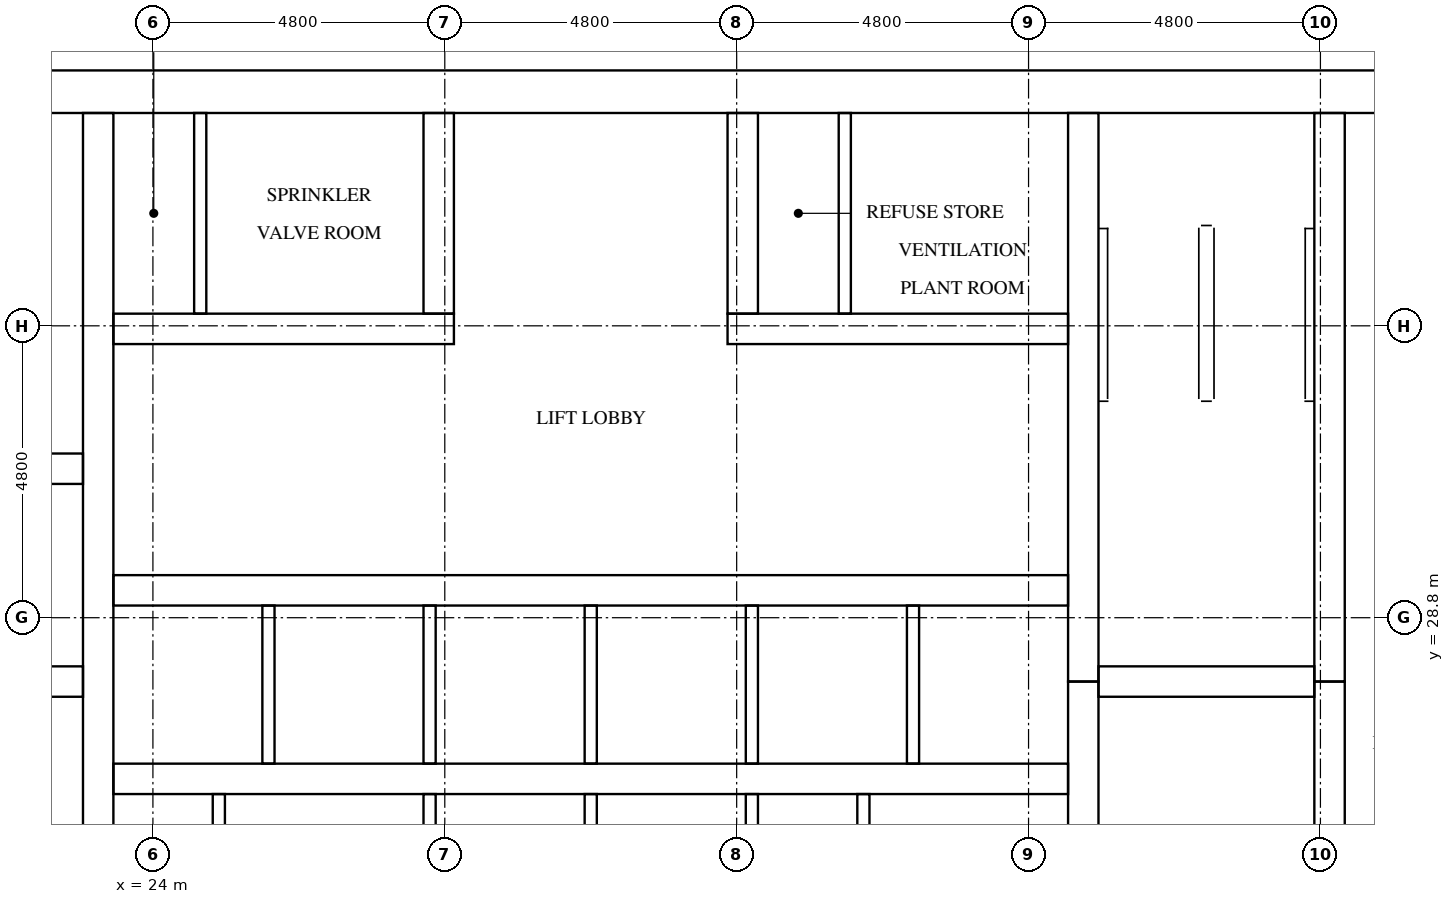
"""IFC4 building model, lengths in metres.
Left out: names, types, materials, properties, quantities, classifications, styles, units other than length and angle.
Written with IfcOpenShell. Run it as: python <this file> out.ifc"""

import sys

from ifc_helpers import new_model, si_unit, direction, frame, frame_2d, origin, place, context, subcontext, project, spatial, rectangle, extrude, element, fill, save


model = new_model("IFC4")
c1 = context("Model", 3, precision=1e-05, world=origin(), true_north=direction((0.0, 1.0)))
c2 = subcontext(c1, "Body", "Model", "MODEL_VIEW")
j1 = project(units=[si_unit("LENGTHUNIT", "METRE"), si_unit("PLANEANGLEUNIT", "RADIAN")], contexts=[c1])
p1 = place(None, origin())
s1 = spatial("IfcSite", under=j1, at=p1, CompositionType="ELEMENT")
p2 = place(p1, origin())
s2 = spatial("IfcBuilding", under=s1, at=p2, CompositionType="ELEMENT")
p3 = place(p2, frame((0.0, 0.0, 189.4)))
s3 = spatial("IfcBuildingStorey", under=s2, at=p3, CompositionType="ELEMENT", Elevation=189.4)
p4 = place(p3, frame((15.0, 37.45, 0.0), z_axis=(0.0, 0.0, 1.0), x_axis=(1.0, 0.0, 0.0)))
e1 = element("IfcWall", 1, at=p4, inside=s3, PredefinedType="SHEAR", context=c2, shape_type="SweptSolid", body=[
    extrude(rectangle(XDim=32.4, YDim=0.7, at=frame_2d((16.2, 0.0))), origin(), (0.0, 0.0, 1.0), 3.2),
])
p5 = place(p4, frame((15.3, 0.0, 0.0)))
e2 = element("IfcOpeningElement", 2, at=p5, cuts=e1, PredefinedType="OPENING", context=c2, shape_type="SweptSolid", body=[
    extrude(rectangle(XDim=1.8, YDim=2.1, at=frame_2d((0.9, 1.05))), frame((0.0, 0.36, 0.0), z_axis=(0.0, -1.0, 0.0), x_axis=(1.0, 0.0, 0.0)), (0.0, 0.0, 1.0), 0.72),
])
p6 = place(p4, frame((1.544, 0.0, 0.0)))
e3 = element("IfcOpeningElement", 3, at=p6, cuts=e1, PredefinedType="OPENING", context=c2, shape_type="SweptSolid", body=[
    extrude(rectangle(XDim=1.0, YDim=2.1, at=frame_2d((0.5, 1.05))), frame((0.0, 0.36, 0.0), z_axis=(0.0, -1.0, 0.0), x_axis=(1.0, 0.0, 0.0)), (0.0, 0.0, 1.0), 0.72),
])
p7 = place(p4, frame((5.219, 0.0, 0.0)))
e4 = element("IfcOpeningElement", 4, at=p7, cuts=e1, PredefinedType="OPENING", context=c2, shape_type="SweptSolid", body=[
    extrude(rectangle(XDim=1.0, YDim=2.1, at=frame_2d((0.5, 1.05))), frame((0.0, 0.36, 0.0), z_axis=(0.0, -1.0, 0.0), x_axis=(1.0, 0.0, 0.0)), (0.0, 0.0, 1.0), 0.72),
])
p8 = place(p3, frame((23.1, 15.7, 0.0), z_axis=(0.0, 0.0, 1.0), x_axis=(0.0, 1.0, 0.0)))
e5 = element("IfcWall", 5, at=p8, inside=s3, PredefinedType="SHEAR", context=c2, shape_type="SweptSolid", body=[
    extrude(rectangle(XDim=21.4, YDim=0.5, at=frame_2d((10.7, 0.0))), origin(), (0.0, 0.0, 1.0), 3.2),
])
p9 = place(p3, frame((39.3, 24.25, 0.0), z_axis=(0.0, 0.0, 1.0), x_axis=(0.0, 1.0, 0.0)))
e6 = element("IfcWall", 6, at=p9, inside=s3, PredefinedType="SHEAR", context=c2, shape_type="SweptSolid", body=[
    extrude(rectangle(XDim=3.5, YDim=0.5, at=frame_2d((1.75, 0.0))), origin(), (0.0, 0.0, 1.0), 3.2),
])
p10 = place(p3, frame((39.3, 27.75, 0.0), z_axis=(0.0, 0.0, 1.0), x_axis=(0.0, 1.0, 0.0)))
e7 = element("IfcWall", 7, at=p10, inside=s3, PredefinedType="SHEAR", context=c2, shape_type="SweptSolid", body=[
    extrude(rectangle(XDim=9.35, YDim=0.5, at=frame_2d((4.675, 0.0))), origin(), (0.0, 0.0, 1.0), 3.2),
])
p11 = place(p3, frame((43.35, 24.25, 0.0), z_axis=(0.0, 0.0, 1.0), x_axis=(0.0, 1.0, 0.0)))
e8 = element("IfcWall", 8, at=p11, inside=s3, PredefinedType="SHEAR", context=c2, shape_type="SweptSolid", body=[
    extrude(rectangle(XDim=3.5, YDim=0.5, at=frame_2d((1.75, 0.0))), origin(), (0.0, 0.0, 1.0), 3.2),
])
p12 = place(p11, frame((1.2, 0.0, 0.0)))
e9 = element("IfcOpeningElement", 9, at=p12, cuts=e8, PredefinedType="OPENING", context=c2, shape_type="SweptSolid", body=[
    extrude(rectangle(XDim=1.1, YDim=2.1, at=frame_2d((0.55, 1.05))), frame((0.0, 0.26, 0.0), z_axis=(0.0, -1.0, 0.0), x_axis=(1.0, 0.0, 0.0)), (0.0, 0.0, 1.0), 0.52),
])
p13 = place(p3, frame((43.35, 27.75, 0.0), z_axis=(0.0, 0.0, 1.0), x_axis=(0.0, 1.0, 0.0)))
e10 = element("IfcWall", 10, at=p13, inside=s3, PredefinedType="SHEAR", context=c2, shape_type="SweptSolid", body=[
    extrude(rectangle(XDim=9.35, YDim=0.5, at=frame_2d((4.675, 0.0))), origin(), (0.0, 0.0, 1.0), 3.2),
])
p14 = place(p13, frame((7.65, 0.0, 0.0)))
e11 = element("IfcOpeningElement", 11, at=p14, cuts=e10, PredefinedType="OPENING", context=c2, shape_type="SweptSolid", body=[
    extrude(rectangle(XDim=1.2, YDim=2.1, at=frame_2d((0.6, 1.05))), frame((0.0, 0.26, 0.0), z_axis=(0.0, -1.0, 0.0), x_axis=(1.0, 0.0, 0.0)), (0.0, 0.0, 1.0), 0.52),
])
p15 = place(p3, frame((19.3, 27.75, 0.0), z_axis=(0.0, 0.0, 1.0), x_axis=(1.0, 0.0, 0.0)))
e12 = element("IfcWall", 12, at=p15, inside=s3, PredefinedType="SHEAR", context=c2, shape_type="SweptSolid", body=[
    extrude(rectangle(XDim=3.55, YDim=0.5, at=frame_2d((1.775, 0.0))), origin(), (0.0, 0.0, 1.0), 3.2),
])
p16 = place(p3, frame((15.7, 31.25, 0.0), z_axis=(0.0, 0.0, 1.0), x_axis=(1.0, 0.0, 0.0)))
e13 = element("IfcWall", 13, at=p16, inside=s3, PredefinedType="SHEAR", context=c2, shape_type="SweptSolid", body=[
    extrude(rectangle(XDim=7.15, YDim=0.5, at=frame_2d((3.575, 0.0))), origin(), (0.0, 0.0, 1.0), 3.2),
])
p17 = place(p3, frame((39.55, 27.75, 0.0), z_axis=(0.0, 0.0, 1.0), x_axis=(1.0, 0.0, 0.0)))
e14 = element("IfcWall", 14, at=p17, inside=s3, PredefinedType="SHEAR", context=c2, shape_type="SweptSolid", body=[
    extrude(rectangle(XDim=3.55, YDim=0.5, at=frame_2d((1.775, 0.0))), origin(), (0.0, 0.0, 1.0), 3.2),
])
p18 = place(p3, frame((23.35, 26.15, 0.0), z_axis=(0.0, 0.0, 1.0), x_axis=(1.0, 0.0, 0.0)))
e15 = element("IfcWall", 15, at=p18, inside=s3, PredefinedType="SHEAR", context=c2, shape_type="SweptSolid", body=[
    extrude(rectangle(XDim=15.7, YDim=0.5, at=frame_2d((7.85, 0.0))), origin(), (0.0, 0.0, 1.0), 3.2),
])
p19 = place(p3, frame((23.35, 29.25, 0.0), z_axis=(0.0, 0.0, 1.0), x_axis=(1.0, 0.0, 0.0)))
e16 = element("IfcWall", 16, at=p19, inside=s3, PredefinedType="SHEAR", context=c2, shape_type="SweptSolid", body=[
    extrude(rectangle(XDim=15.7, YDim=0.5, at=frame_2d((7.85, 0.0))), origin(), (0.0, 0.0, 1.0), 3.2),
])
p20 = place(p19, frame((0.675, 0.0, 0.0)))
e17 = element("IfcOpeningElement", 17, at=p20, cuts=e16, PredefinedType="OPENING", context=c2, shape_type="SweptSolid", body=[
    extrude(rectangle(XDim=1.1, YDim=2.1, at=frame_2d((0.55, 1.05))), frame((0.0, 0.26, 0.0), z_axis=(0.0, -1.0, 0.0), x_axis=(1.0, 0.0, 0.0)), (0.0, 0.0, 1.0), 0.52),
])
p21 = place(p19, frame((3.325, 0.0, 0.0)))
e18 = element("IfcOpeningElement", 18, at=p21, cuts=e16, PredefinedType="OPENING", context=c2, shape_type="SweptSolid", body=[
    extrude(rectangle(XDim=1.1, YDim=2.1, at=frame_2d((0.55, 1.05))), frame((0.0, 0.26, 0.0), z_axis=(0.0, -1.0, 0.0), x_axis=(1.0, 0.0, 0.0)), (0.0, 0.0, 1.0), 0.52),
])
p22 = place(p19, frame((5.975, 0.0, 0.0)))
e19 = element("IfcOpeningElement", 19, at=p22, cuts=e16, PredefinedType="OPENING", context=c2, shape_type="SweptSolid", body=[
    extrude(rectangle(XDim=1.1, YDim=2.1, at=frame_2d((0.55, 1.05))), frame((0.0, 0.26, 0.0), z_axis=(0.0, -1.0, 0.0), x_axis=(1.0, 0.0, 0.0)), (0.0, 0.0, 1.0), 0.52),
])
p23 = place(p19, frame((8.625, 0.0, 0.0)))
e20 = element("IfcOpeningElement", 20, at=p23, cuts=e16, PredefinedType="OPENING", context=c2, shape_type="SweptSolid", body=[
    extrude(rectangle(XDim=1.1, YDim=2.1, at=frame_2d((0.55, 1.05))), frame((0.0, 0.26, 0.0), z_axis=(0.0, -1.0, 0.0), x_axis=(1.0, 0.0, 0.0)), (0.0, 0.0, 1.0), 0.52),
])
p24 = place(p19, frame((11.275, 0.0, 0.0)))
e21 = element("IfcOpeningElement", 21, at=p24, cuts=e16, PredefinedType="OPENING", context=c2, shape_type="SweptSolid", body=[
    extrude(rectangle(XDim=1.1, YDim=2.1, at=frame_2d((0.55, 1.05))), frame((0.0, 0.26, 0.0), z_axis=(0.0, -1.0, 0.0), x_axis=(1.0, 0.0, 0.0)), (0.0, 0.0, 1.0), 0.52),
])
p25 = place(p19, frame((13.925, 0.0, 0.0)))
e22 = element("IfcOpeningElement", 22, at=p25, cuts=e16, PredefinedType="OPENING", context=c2, shape_type="SweptSolid", body=[
    extrude(rectangle(XDim=1.1, YDim=2.1, at=frame_2d((0.55, 1.05))), frame((0.0, 0.26, 0.0), z_axis=(0.0, -1.0, 0.0), x_axis=(1.0, 0.0, 0.0)), (0.0, 0.0, 1.0), 0.52),
])
p26 = place(p3, frame((23.35, 33.55, 0.0), z_axis=(0.0, 0.0, 1.0), x_axis=(1.0, 0.0, 0.0)))
e23 = element("IfcWall", 23, at=p26, inside=s3, PredefinedType="SHEAR", context=c2, shape_type="SweptSolid", body=[
    extrude(rectangle(XDim=5.6, YDim=0.5, at=frame_2d((2.8, 0.0))), origin(), (0.0, 0.0, 1.0), 3.2),
])
p27 = place(p26, frame((0.164, 0.0, 0.0)))
e24 = element("IfcOpeningElement", 24, at=p27, cuts=e23, PredefinedType="OPENING", context=c2, shape_type="SweptSolid", body=[
    extrude(rectangle(XDim=1.0, YDim=2.1, at=frame_2d((0.5, 1.05))), frame((0.0, 0.26, 0.0), z_axis=(0.0, -1.0, 0.0), x_axis=(1.0, 0.0, 0.0)), (0.0, 0.0, 1.0), 0.52),
])
p28 = place(p26, frame((2.814, 0.0, 0.0)))
e25 = element("IfcOpeningElement", 25, at=p28, cuts=e23, PredefinedType="OPENING", context=c2, shape_type="SweptSolid", body=[
    extrude(rectangle(XDim=1.0, YDim=2.1, at=frame_2d((0.5, 1.05))), frame((0.0, 0.26, 0.0), z_axis=(0.0, -1.0, 0.0), x_axis=(1.0, 0.0, 0.0)), (0.0, 0.0, 1.0), 0.52),
])
p29 = place(p3, frame((33.45, 33.55, 0.0), z_axis=(0.0, 0.0, 1.0), x_axis=(1.0, 0.0, 0.0)))
e26 = element("IfcWall", 26, at=p29, inside=s3, PredefinedType="SHEAR", context=c2, shape_type="SweptSolid", body=[
    extrude(rectangle(XDim=5.6, YDim=0.5, at=frame_2d((2.8, 0.0))), origin(), (0.0, 0.0, 1.0), 3.2),
])
p30 = place(p29, frame((0.664, 0.0, 0.0)))
e27 = element("IfcOpeningElement", 27, at=p30, cuts=e26, PredefinedType="OPENING", context=c2, shape_type="SweptSolid", body=[
    extrude(rectangle(XDim=1.0, YDim=2.1, at=frame_2d((0.5, 1.05))), frame((0.0, 0.26, 0.0), z_axis=(0.0, -1.0, 0.0), x_axis=(1.0, 0.0, 0.0)), (0.0, 0.0, 1.0), 0.52),
])
p31 = place(p29, frame((3.314, 0.0, 0.0)))
e28 = element("IfcOpeningElement", 28, at=p31, cuts=e26, PredefinedType="OPENING", context=c2, shape_type="SweptSolid", body=[
    extrude(rectangle(XDim=1.0, YDim=2.1, at=frame_2d((0.5, 1.05))), frame((0.0, 0.26, 0.0), z_axis=(0.0, -1.0, 0.0), x_axis=(1.0, 0.0, 0.0)), (0.0, 0.0, 1.0), 0.52),
])
for number, where, z_axis, x_axis in (
    (29, (28.7, 33.8, 0.0), (0.0, 0.0, 1.0), (0.0, 1.0, 0.0)),
    (30, (33.7, 33.8, 0.0), (0.0, 0.0, 1.0), (0.0, 1.0, 0.0)),
):
    element("IfcWall", number, at=place(p3, frame(where, z_axis=z_axis, x_axis=x_axis)), inside=s3, PredefinedType="SHEAR", context=c2, shape_type="SweptSolid", body=[
        extrude(rectangle(XDim=3.3, YDim=0.5, at=frame_2d((1.65, 0.0))), origin(), (0.0, 0.0, 1.0), 3.2),
    ])
p32 = place(p3, frame((25.9, 26.4, 0.0), z_axis=(0.0, 0.0, 1.0), x_axis=(0.0, 1.0, 0.0)))
e31 = element("IfcWall", 31, at=p32, inside=s3, PredefinedType="SOLIDWALL", context=c2, shape_type="SweptSolid", body=[
    extrude(rectangle(XDim=2.6, YDim=0.2, at=frame_2d((1.3, 0.0))), origin(), (0.0, 0.0, 1.0), 3.2),
])
p33 = place(p3, frame((28.55, 23.3, 0.0), z_axis=(0.0, 0.0, 1.0), x_axis=(0.0, 1.0, 0.0)))
e32 = element("IfcWall", 32, at=p33, inside=s3, PredefinedType="SOLIDWALL", context=c2, shape_type="SweptSolid", body=[
    extrude(rectangle(XDim=2.6, YDim=0.2, at=frame_2d((1.3, 0.0))), origin(), (0.0, 0.0, 1.0), 3.2),
])
p34 = place(p3, frame((28.55, 26.4, 0.0), z_axis=(0.0, 0.0, 1.0), x_axis=(0.0, 1.0, 0.0)))
e33 = element("IfcWall", 33, at=p34, inside=s3, PredefinedType="SOLIDWALL", context=c2, shape_type="SweptSolid", body=[
    extrude(rectangle(XDim=2.6, YDim=0.2, at=frame_2d((1.3, 0.0))), origin(), (0.0, 0.0, 1.0), 3.2),
])
p35 = place(p3, frame((31.2, 23.3, 0.0), z_axis=(0.0, 0.0, 1.0), x_axis=(0.0, 1.0, 0.0)))
e34 = element("IfcWall", 34, at=p35, inside=s3, PredefinedType="SOLIDWALL", context=c2, shape_type="SweptSolid", body=[
    extrude(rectangle(XDim=2.6, YDim=0.2, at=frame_2d((1.3, 0.0))), origin(), (0.0, 0.0, 1.0), 3.2),
])
p36 = place(p3, frame((31.2, 26.4, 0.0), z_axis=(0.0, 0.0, 1.0), x_axis=(0.0, 1.0, 0.0)))
e35 = element("IfcWall", 35, at=p36, inside=s3, PredefinedType="SOLIDWALL", context=c2, shape_type="SweptSolid", body=[
    extrude(rectangle(XDim=2.6, YDim=0.2, at=frame_2d((1.3, 0.0))), origin(), (0.0, 0.0, 1.0), 3.2),
])
p37 = place(p3, frame((33.85, 23.3, 0.0), z_axis=(0.0, 0.0, 1.0), x_axis=(0.0, 1.0, 0.0)))
e36 = element("IfcWall", 36, at=p37, inside=s3, PredefinedType="SOLIDWALL", context=c2, shape_type="SweptSolid", body=[
    extrude(rectangle(XDim=2.6, YDim=0.2, at=frame_2d((1.3, 0.0))), origin(), (0.0, 0.0, 1.0), 3.2),
])
for number, where, z_axis, x_axis in (
    (37, (33.85, 26.4, 0.0), (0.0, 0.0, 1.0), (0.0, 1.0, 0.0)),
    (38, (36.5, 26.4, 0.0), (0.0, 0.0, 1.0), (0.0, 1.0, 0.0)),
):
    element("IfcWall", number, at=place(p3, frame(where, z_axis=z_axis, x_axis=x_axis)), inside=s3, PredefinedType="SOLIDWALL", context=c2, shape_type="SweptSolid", body=[
        extrude(rectangle(XDim=2.6, YDim=0.2, at=frame_2d((1.3, 0.0))), origin(), (0.0, 0.0, 1.0), 3.2),
    ])
for number, where, z_axis, x_axis in (
    (39, (25.084, 23.3, 0.0), (0.0, 0.0, 1.0), (0.0, 1.0, 0.0)),
    (40, (35.684, 23.3, 0.0), (0.0, 0.0, 1.0), (0.0, 1.0, 0.0)),
):
    element("IfcWall", number, at=place(p3, frame(where, z_axis=z_axis, x_axis=x_axis)), inside=s3, PredefinedType="PARTITIONING", context=c2, shape_type="SweptSolid", body=[
        extrude(rectangle(XDim=2.6, YDim=0.2, at=frame_2d((1.3, 0.0))), origin(), (0.0, 0.0, 1.0), 3.2),
    ])
for number, where, z_axis, x_axis in (
    (41, (24.778, 33.8, 0.0), (0.0, 0.0, 1.0), (0.0, 1.0, 0.0)),
    (42, (35.378, 33.8, 0.0), (0.0, 0.0, 1.0), (0.0, 1.0, 0.0)),
):
    element("IfcWall", number, at=place(p3, frame(where, z_axis=z_axis, x_axis=x_axis)), inside=s3, PredefinedType="PARTITIONING", context=c2, shape_type="SweptSolid", body=[
        extrude(rectangle(XDim=3.3, YDim=0.2, at=frame_2d((1.65, 0.0))), origin(), (0.0, 0.0, 1.0), 3.2),
    ])
p38 = place(p20, origin())
e43 = element("IfcDoor", 43, at=p38, inside=s3, OperationType="DOUBLE_DOOR_SLIDING", PredefinedType="DOOR", context=c2, shape_type="SweptSolid", body=[
    extrude(rectangle(XDim=1.1, YDim=2.1, at=frame_2d((0.55, 1.05))), frame((0.0, 0.025, 0.0), z_axis=(0.0, -1.0, 0.0), x_axis=(1.0, 0.0, 0.0)), (0.0, 0.0, 1.0), 0.05),
])
fill(e17, e43)
p39 = place(p21, origin())
e44 = element("IfcDoor", 44, at=p39, inside=s3, OperationType="DOUBLE_DOOR_SLIDING", PredefinedType="DOOR", context=c2, shape_type="SweptSolid", body=[
    extrude(rectangle(XDim=1.1, YDim=2.1, at=frame_2d((0.55, 1.05))), frame((0.0, 0.025, 0.0), z_axis=(0.0, -1.0, 0.0), x_axis=(1.0, 0.0, 0.0)), (0.0, 0.0, 1.0), 0.05),
])
fill(e18, e44)
p40 = place(p22, origin())
e45 = element("IfcDoor", 45, at=p40, inside=s3, OperationType="DOUBLE_DOOR_SLIDING", PredefinedType="DOOR", context=c2, shape_type="SweptSolid", body=[
    extrude(rectangle(XDim=1.1, YDim=2.1, at=frame_2d((0.55, 1.05))), frame((0.0, 0.025, 0.0), z_axis=(0.0, -1.0, 0.0), x_axis=(1.0, 0.0, 0.0)), (0.0, 0.0, 1.0), 0.05),
])
fill(e19, e45)
p41 = place(p23, origin())
e46 = element("IfcDoor", 46, at=p41, inside=s3, OperationType="DOUBLE_DOOR_SLIDING", PredefinedType="DOOR", context=c2, shape_type="SweptSolid", body=[
    extrude(rectangle(XDim=1.1, YDim=2.1, at=frame_2d((0.55, 1.05))), frame((0.0, 0.025, 0.0), z_axis=(0.0, -1.0, 0.0), x_axis=(1.0, 0.0, 0.0)), (0.0, 0.0, 1.0), 0.05),
])
fill(e20, e46)
p42 = place(p24, origin())
e47 = element("IfcDoor", 47, at=p42, inside=s3, OperationType="DOUBLE_DOOR_SLIDING", PredefinedType="DOOR", context=c2, shape_type="SweptSolid", body=[
    extrude(rectangle(XDim=1.1, YDim=2.1, at=frame_2d((0.55, 1.05))), frame((0.0, 0.025, 0.0), z_axis=(0.0, -1.0, 0.0), x_axis=(1.0, 0.0, 0.0)), (0.0, 0.0, 1.0), 0.05),
])
fill(e21, e47)
p43 = place(p25, origin())
e48 = element("IfcDoor", 48, at=p43, inside=s3, OperationType="DOUBLE_DOOR_SLIDING", PredefinedType="DOOR", context=c2, shape_type="SweptSolid", body=[
    extrude(rectangle(XDim=1.1, YDim=2.1, at=frame_2d((0.55, 1.05))), frame((0.0, 0.025, 0.0), z_axis=(0.0, -1.0, 0.0), x_axis=(1.0, 0.0, 0.0)), (0.0, 0.0, 1.0), 0.05),
])
fill(e22, e48)
p44 = place(p12, origin())
e49 = element("IfcDoor", 49, at=p44, inside=s3, OperationType="DOUBLE_DOOR_SLIDING", PredefinedType="DOOR", context=c2, shape_type="SweptSolid", body=[
    extrude(rectangle(XDim=1.1, YDim=2.1, at=frame_2d((0.55, 1.05))), frame((0.0, 0.025, 0.0), z_axis=(0.0, -1.0, 0.0), x_axis=(1.0, 0.0, 0.0)), (0.0, 0.0, 1.0), 0.05),
])
fill(e9, e49)
p45 = place(p14, origin())
e50 = element("IfcDoor", 50, at=p45, inside=s3, OperationType="SINGLE_SWING_LEFT", PredefinedType="DOOR", context=c2, shape_type="SweptSolid", body=[
    extrude(rectangle(XDim=1.2, YDim=2.1, at=frame_2d((0.6, 1.05))), frame((0.0, 0.025, 0.0), z_axis=(0.0, -1.0, 0.0), x_axis=(1.0, 0.0, 0.0)), (0.0, 0.0, 1.0), 0.05),
])
fill(e11, e50)
p46 = place(p5, origin())
e51 = element("IfcDoor", 51, at=p46, inside=s3, OperationType="DOUBLE_DOOR_SINGLE_SWING", PredefinedType="DOOR", context=c2, shape_type="SweptSolid", body=[
    extrude(rectangle(XDim=1.8, YDim=2.1, at=frame_2d((0.9, 1.05))), frame((0.0, 0.025, 0.0), z_axis=(0.0, -1.0, 0.0), x_axis=(1.0, 0.0, 0.0)), (0.0, 0.0, 1.0), 0.05),
])
fill(e2, e51)
p47 = place(p27, frame((1.0, 0.0, 0.0), z_axis=(0.0, 0.0, 1.0), x_axis=(-1.0, 0.0, 0.0)))
e52 = element("IfcDoor", 52, at=p47, inside=s3, OperationType="SINGLE_SWING_RIGHT", PredefinedType="DOOR", context=c2, shape_type="SweptSolid", body=[
    extrude(rectangle(XDim=1.0, YDim=2.1, at=frame_2d((0.5, 1.05))), frame((0.0, 0.025, 0.0), z_axis=(0.0, -1.0, 0.0), x_axis=(1.0, 0.0, 0.0)), (0.0, 0.0, 1.0), 0.05),
])
fill(e24, e52)
p48 = place(p28, frame((1.0, 0.0, 0.0), z_axis=(0.0, 0.0, 1.0), x_axis=(-1.0, 0.0, 0.0)))
e53 = element("IfcDoor", 53, at=p48, inside=s3, OperationType="SINGLE_SWING_LEFT", PredefinedType="DOOR", context=c2, shape_type="SweptSolid", body=[
    extrude(rectangle(XDim=1.0, YDim=2.1, at=frame_2d((0.5, 1.05))), frame((0.0, 0.025, 0.0), z_axis=(0.0, -1.0, 0.0), x_axis=(1.0, 0.0, 0.0)), (0.0, 0.0, 1.0), 0.05),
])
fill(e25, e53)
p49 = place(p30, frame((1.0, 0.0, 0.0), z_axis=(0.0, 0.0, 1.0), x_axis=(-1.0, 0.0, 0.0)))
e54 = element("IfcDoor", 54, at=p49, inside=s3, OperationType="SINGLE_SWING_RIGHT", PredefinedType="DOOR", context=c2, shape_type="SweptSolid", body=[
    extrude(rectangle(XDim=1.0, YDim=2.1, at=frame_2d((0.5, 1.05))), frame((0.0, 0.025, 0.0), z_axis=(0.0, -1.0, 0.0), x_axis=(1.0, 0.0, 0.0)), (0.0, 0.0, 1.0), 0.05),
])
fill(e27, e54)
p50 = place(p31, frame((1.0, 0.0, 0.0), z_axis=(0.0, 0.0, 1.0), x_axis=(-1.0, 0.0, 0.0)))
e55 = element("IfcDoor", 55, at=p50, inside=s3, OperationType="SINGLE_SWING_LEFT", PredefinedType="DOOR", context=c2, shape_type="SweptSolid", body=[
    extrude(rectangle(XDim=1.0, YDim=2.1, at=frame_2d((0.5, 1.05))), frame((0.0, 0.025, 0.0), z_axis=(0.0, -1.0, 0.0), x_axis=(1.0, 0.0, 0.0)), (0.0, 0.0, 1.0), 0.05),
])
fill(e28, e55)
save(model, sys.argv[1])
